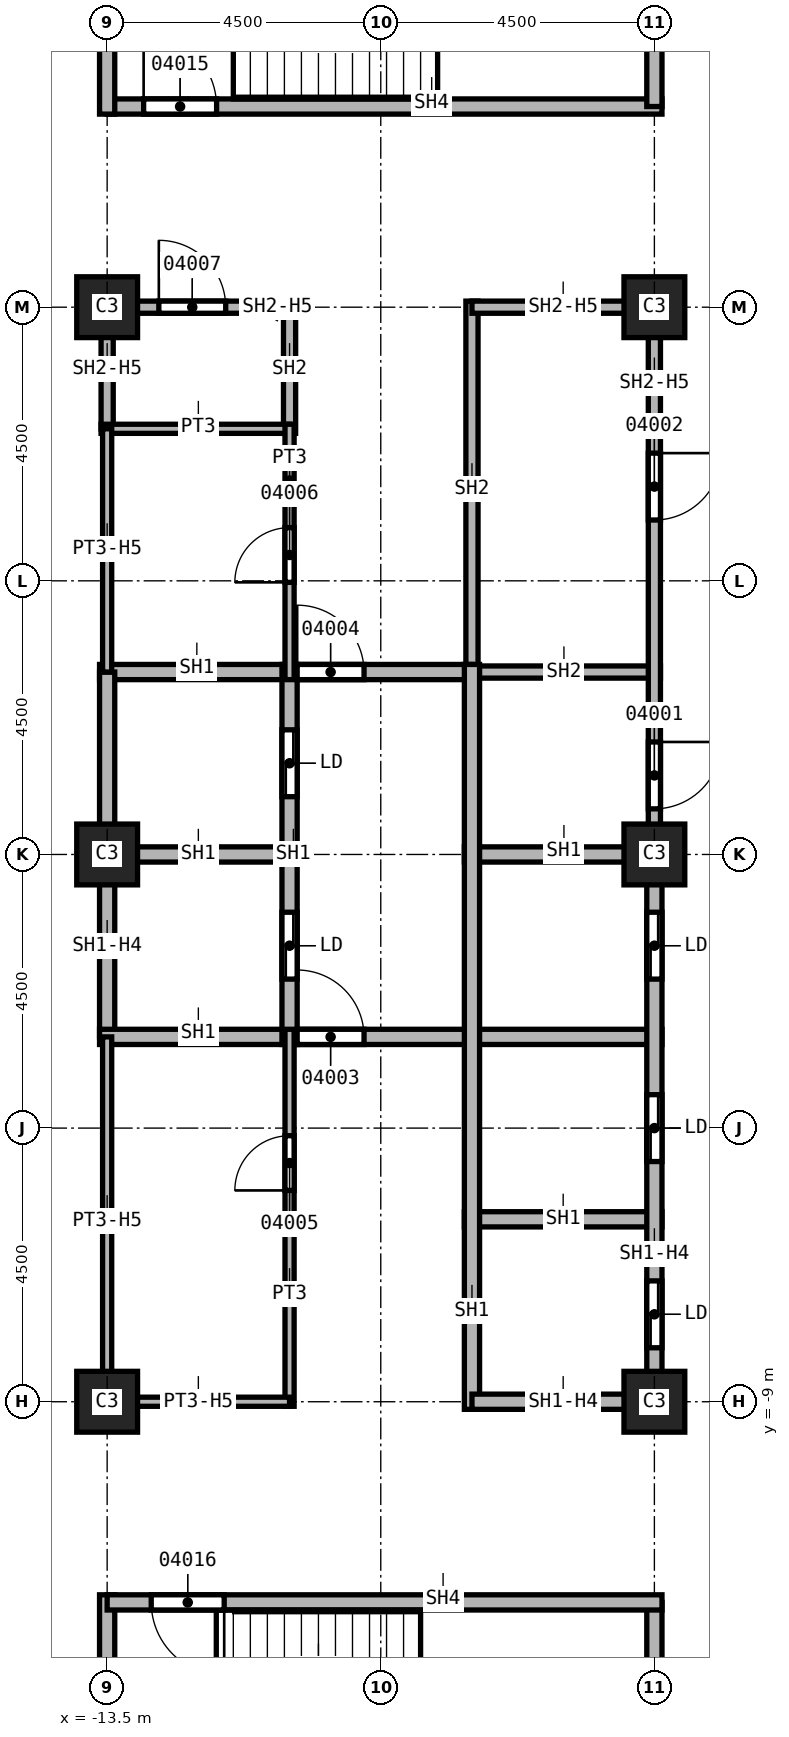
"""IFC4 building model, lengths in metres.
Left out: names, types, materials, properties, quantities, classifications, styles, units other than length and angle.
Written with IfcOpenShell. Run it as: python <this file> out.ifc"""

import sys

from ifc_helpers import new_model, si_unit, direction, frame, frame_2d, origin, origin_2d, place, context, subcontext, project, spatial, rectangle, extrude, element, fill, save


model = new_model("IFC4")
c1 = context("Model", 3, precision=1e-05, world=origin(), true_north=direction((0.0, 1.0)))
c2 = subcontext(c1, "Body", "Model", "MODEL_VIEW")
j1 = project(units=[si_unit("LENGTHUNIT", "METRE"), si_unit("PLANEANGLEUNIT", "RADIAN")], contexts=[c1])
p1 = place(None, origin())
s1 = spatial("IfcSite", under=j1, at=p1, CompositionType="ELEMENT")
p2 = place(p1, origin())
s2 = spatial("IfcBuilding", under=s1, at=p2, CompositionType="ELEMENT")
p3 = place(p2, frame((0.0, 0.0, 108.0)))
s3 = spatial("IfcBuildingStorey", under=s2, at=p3, CompositionType="ELEMENT", Elevation=108.0)
for number, where, z_axis, x_axis in (
    (1, (-4.5, 0.0, 0.0), (0.0, 0.0, 1.0), (1.0, 0.0, 0.0)),
    (2, (-4.5, 9.0, 0.0), (0.0, 0.0, 1.0), (1.0, 0.0, 0.0)),
    (3, (-4.5, -9.0, 0.0), (0.0, 0.0, 1.0), (1.0, 0.0, 0.0)),
    (4, (-13.5, 0.0, 0.0), (0.0, 0.0, 1.0), (1.0, 0.0, 0.0)),
    (5, (-13.5, 9.0, 0.0), (0.0, 0.0, 1.0), (1.0, 0.0, 0.0)),
    (6, (-13.5, -9.0, 0.0), (0.0, 0.0, 1.0), (1.0, 0.0, 0.0)),
):
    element("IfcColumn", number, at=place(p3, frame(where, z_axis=z_axis, x_axis=x_axis)), inside=s3, PredefinedType="COLUMN", context=c2, shape_type="SweptSolid", body=[
        extrude(rectangle(XDim=1.0, YDim=1.0, at=origin_2d()), origin(), (0.0, 0.0, 1.0), 3.7),
    ])
p4 = place(p3, frame((-13.5, 7.0, 0.0), z_axis=(0.0, 0.0, 1.0), x_axis=(0.0, 1.0, 0.0)))
e7 = element("IfcWall", 7, at=p4, inside=s3, PredefinedType="SOLIDWALL", context=c2, shape_type="SweptSolid", body=[
    extrude(rectangle(XDim=2.1, YDim=0.2, at=frame_2d((1.05, 0.0))), origin(), (0.0, 0.0, 1.0), 2.938),
])
p5 = place(p3, frame((-13.5, 9.0, 0.0), z_axis=(0.0, 0.0, 1.0), x_axis=(1.0, 0.0, 0.0)))
e8 = element("IfcWall", 8, at=p5, inside=s3, PredefinedType="SOLIDWALL", context=c2, shape_type="SweptSolid", body=[
    extrude(rectangle(XDim=3.0, YDim=0.2, at=frame_2d((1.5, 0.0))), origin(), (0.0, 0.0, 1.0), 2.938),
])
p6 = place(p5, frame((0.85, 0.0, 0.0)))
e9 = element("IfcOpeningElement", 9, at=p6, cuts=e8, PredefinedType="OPENING", context=c2, shape_type="SweptSolid", body=[
    extrude(rectangle(XDim=1.1, YDim=2.1, at=frame_2d((0.55, 1.05))), frame((0.0, 0.1, 0.0), z_axis=(0.0, -1.0, 0.0), x_axis=(1.0, 0.0, 0.0)), (0.0, 0.0, 1.0), 0.2),
])
p7 = place(p3, frame((-10.5, 6.925, 0.0), z_axis=(0.0, 0.0, 1.0), x_axis=(0.0, 1.0, 0.0)))
e10 = element("IfcWall", 10, at=p7, inside=s3, PredefinedType="SOLIDWALL", context=c2, shape_type="SweptSolid", body=[
    extrude(rectangle(XDim=2.175, YDim=0.2, at=frame_2d((1.087, 0.0))), origin(), (0.0, 0.0, 1.0), 3.7),
])
p8 = place(p3, frame((-7.625, 3.0, 0.0), z_axis=(0.0, 0.0, 1.0), x_axis=(1.0, 0.0, 0.0)))
e11 = element("IfcWall", 11, at=p8, inside=s3, PredefinedType="SOLIDWALL", context=c2, shape_type="SweptSolid", body=[
    extrude(rectangle(XDim=3.225, YDim=0.2, at=frame_2d((1.613, 0.0))), origin(), (0.0, 0.0, 1.0), 3.7),
])
p9 = place(p3, frame((-7.5, 2.875, 0.0), z_axis=(0.0, 0.0, 1.0), x_axis=(0.0, 1.0, 0.0)))
e12 = element("IfcWall", 12, at=p9, inside=s3, PredefinedType="SOLIDWALL", context=c2, shape_type="SweptSolid", body=[
    extrude(rectangle(XDim=6.225, YDim=0.2, at=frame_2d((3.113, 0.0))), origin(), (0.0, 0.0, 1.0), 3.7),
])
p10 = place(p3, frame((-7.5, 9.0, 0.0), z_axis=(0.0, 0.0, 1.0), x_axis=(1.0, 0.0, 0.0)))
e13 = element("IfcWall", 13, at=p10, inside=s3, PredefinedType="SOLIDWALL", context=c2, shape_type="SweptSolid", body=[
    extrude(rectangle(XDim=3.0, YDim=0.2, at=frame_2d((1.5, 0.0))), origin(), (0.0, 0.0, 1.0), 2.938),
])
p11 = place(p3, frame((-4.5, 9.1, 0.0), z_axis=(0.0, 0.0, 1.0), x_axis=(0.0, -1.0, 0.0)))
e14 = element("IfcWall", 14, at=p11, inside=s3, PredefinedType="SOLIDWALL", context=c2, shape_type="SweptSolid", body=[
    extrude(rectangle(XDim=9.1, YDim=0.2, at=frame_2d((4.55, 0.0))), origin(), (0.0, 0.0, 1.0), 2.938),
])
p12 = place(p11, frame((7.25, 0.0, 0.0)))
e15 = element("IfcOpeningElement", 15, at=p12, cuts=e14, PredefinedType="OPENING", context=c2, shape_type="SweptSolid", body=[
    extrude(rectangle(XDim=1.1, YDim=2.1, at=frame_2d((0.55, 1.05))), frame((0.0, 0.1, 0.0), z_axis=(0.0, -1.0, 0.0), x_axis=(1.0, 0.0, 0.0)), (0.0, 0.0, 1.0), 0.2),
])
p13 = place(p11, frame((2.5, 0.0, 0.0)))
e16 = element("IfcOpeningElement", 16, at=p13, cuts=e14, PredefinedType="OPENING", context=c2, shape_type="SweptSolid", body=[
    extrude(rectangle(XDim=1.1, YDim=2.1, at=frame_2d((0.55, 1.05))), frame((0.0, 0.1, 0.0), z_axis=(0.0, -1.0, 0.0), x_axis=(1.0, 0.0, 0.0)), (0.0, 0.0, 1.0), 0.2),
])
p14 = place(p3, frame((-13.625, 0.0, 0.0), z_axis=(0.0, 0.0, 1.0), x_axis=(1.0, 0.0, 0.0)))
e17 = element("IfcWall", 17, at=p14, inside=s3, PredefinedType="SOLIDWALL", context=c2, shape_type="SweptSolid", body=[
    extrude(rectangle(XDim=3.125, YDim=0.25, at=frame_2d((1.562, 0.0))), origin(), (0.0, 0.0, 1.0), 3.7),
])
p15 = place(p3, frame((-13.625, 3.0, 0.0), z_axis=(0.0, 0.0, 1.0), x_axis=(1.0, 0.0, 0.0)))
e18 = element("IfcWall", 18, at=p15, inside=s3, PredefinedType="SOLIDWALL", context=c2, shape_type="SweptSolid", body=[
    extrude(rectangle(XDim=6.125, YDim=0.25, at=frame_2d((3.062, 0.0))), origin(), (0.0, 0.0, 1.0), 3.7),
])
p16 = place(p15, frame((3.25, 0.0, 0.0)))
e19 = element("IfcOpeningElement", 19, at=p16, cuts=e18, PredefinedType="OPENING", context=c2, shape_type="SweptSolid", body=[
    extrude(rectangle(XDim=1.1, YDim=2.1, at=frame_2d((0.55, 1.05))), frame((0.0, 0.125, 0.0), z_axis=(0.0, -1.0, 0.0), x_axis=(1.0, 0.0, 0.0)), (0.0, 0.0, 1.0), 0.25),
])
p17 = place(p3, frame((-13.5, -3.0, 0.0), z_axis=(0.0, 0.0, 1.0), x_axis=(0.0, 1.0, 0.0)))
e20 = element("IfcWall", 20, at=p17, inside=s3, PredefinedType="SOLIDWALL", context=c2, shape_type="SweptSolid", body=[
    extrude(rectangle(XDim=6.0, YDim=0.25, at=frame_2d((3.0, 0.0))), origin(), (0.0, 0.0, 1.0), 2.938),
])
p18 = place(p3, frame((-13.625, -3.0, 0.0), z_axis=(0.0, 0.0, 1.0), x_axis=(1.0, 0.0, 0.0)))
e21 = element("IfcWall", 21, at=p18, inside=s3, PredefinedType="SOLIDWALL", context=c2, shape_type="SweptSolid", body=[
    extrude(rectangle(XDim=9.25, YDim=0.25, at=frame_2d((4.625, 0.0))), origin(), (0.0, 0.0, 1.0), 3.7),
])
p19 = place(p18, frame((3.25, 0.0, 0.0)))
e22 = element("IfcOpeningElement", 22, at=p19, cuts=e21, PredefinedType="OPENING", context=c2, shape_type="SweptSolid", body=[
    extrude(rectangle(XDim=1.1, YDim=2.1, at=frame_2d((0.55, 1.05))), frame((0.0, 0.125, 0.0), z_axis=(0.0, -1.0, 0.0), x_axis=(1.0, 0.0, 0.0)), (0.0, 0.0, 1.0), 0.25),
])
p20 = place(p3, frame((-10.5, -3.125, 0.0), z_axis=(0.0, 0.0, 1.0), x_axis=(0.0, 1.0, 0.0)))
e23 = element("IfcWall", 23, at=p20, inside=s3, PredefinedType="SOLIDWALL", context=c2, shape_type="SweptSolid", body=[
    extrude(rectangle(XDim=6.25, YDim=0.25, at=frame_2d((3.125, 0.0))), origin(), (0.0, 0.0, 1.0), 3.7),
])
p21 = place(p20, frame((1.075, 0.0, 0.0)))
e24 = element("IfcOpeningElement", 24, at=p21, cuts=e23, PredefinedType="OPENING", context=c2, shape_type="SweptSolid", body=[
    extrude(rectangle(XDim=1.1, YDim=2.1, at=frame_2d((0.55, 1.05))), frame((0.0, 0.125, 0.0), z_axis=(0.0, -1.0, 0.0), x_axis=(1.0, 0.0, 0.0)), (0.0, 0.0, 1.0), 0.25),
])
p22 = place(p20, frame((4.075, 0.0, 0.0)))
e25 = element("IfcOpeningElement", 25, at=p22, cuts=e23, PredefinedType="OPENING", context=c2, shape_type="SweptSolid", body=[
    extrude(rectangle(XDim=1.1, YDim=2.1, at=frame_2d((0.55, 1.05))), frame((0.0, 0.125, 0.0), z_axis=(0.0, -1.0, 0.0), x_axis=(1.0, 0.0, 0.0)), (0.0, 0.0, 1.0), 0.25),
])
for number, where, z_axis, x_axis in (
    (26, (-7.625, -6.0, 0.0), (0.0, 0.0, 1.0), (1.0, 0.0, 0.0)),
    (27, (-7.625, 0.0, 0.0), (0.0, 0.0, 1.0), (1.0, 0.0, 0.0)),
):
    element("IfcWall", number, at=place(p3, frame(where, z_axis=z_axis, x_axis=x_axis)), inside=s3, PredefinedType="SOLIDWALL", context=c2, shape_type="SweptSolid", body=[
        extrude(rectangle(XDim=3.25, YDim=0.25, at=frame_2d((1.625, 0.0))), origin(), (0.0, 0.0, 1.0), 3.7),
    ])
p23 = place(p3, frame((-7.5, -9.125, 0.0), z_axis=(0.0, 0.0, 1.0), x_axis=(0.0, 1.0, 0.0)))
e28 = element("IfcWall", 28, at=p23, inside=s3, PredefinedType="SOLIDWALL", context=c2, shape_type="SweptSolid", body=[
    extrude(rectangle(XDim=12.25, YDim=0.25, at=frame_2d((6.125, 0.0))), origin(), (0.0, 0.0, 1.0), 3.7),
])
p24 = place(p3, frame((-4.5, -9.0, 0.0), z_axis=(0.0, 0.0, 1.0), x_axis=(-1.0, 0.0, 0.0)))
e29 = element("IfcWall", 29, at=p24, inside=s3, PredefinedType="SOLIDWALL", context=c2, shape_type="SweptSolid", body=[
    extrude(rectangle(XDim=3.0, YDim=0.25, at=frame_2d((1.5, 0.0))), origin(), (0.0, 0.0, 1.0), 2.938),
])
p25 = place(p3, frame((-4.5, 0.0, 0.0), z_axis=(0.0, 0.0, 1.0), x_axis=(0.0, -1.0, 0.0)))
e30 = element("IfcWall", 30, at=p25, inside=s3, PredefinedType="SOLIDWALL", context=c2, shape_type="SweptSolid", body=[
    extrude(rectangle(XDim=9.125, YDim=0.25, at=frame_2d((4.562, 0.0))), origin(), (0.0, 0.0, 1.0), 2.938),
])
p26 = place(p25, frame((7.012, 0.0, 0.0)))
e31 = element("IfcOpeningElement", 31, at=p26, cuts=e30, PredefinedType="OPENING", context=c2, shape_type="SweptSolid", body=[
    extrude(rectangle(XDim=1.1, YDim=2.1, at=frame_2d((0.55, 1.05))), frame((0.0, 0.125, 0.0), z_axis=(0.0, -1.0, 0.0), x_axis=(1.0, 0.0, 0.0)), (0.0, 0.0, 1.0), 0.25),
])
p27 = place(p25, frame((3.95, 0.0, 0.0)))
e32 = element("IfcOpeningElement", 32, at=p27, cuts=e30, PredefinedType="OPENING", context=c2, shape_type="SweptSolid", body=[
    extrude(rectangle(XDim=1.1, YDim=2.1, at=frame_2d((0.55, 1.05))), frame((0.0, 0.125, 0.0), z_axis=(0.0, -1.0, 0.0), x_axis=(1.0, 0.0, 0.0)), (0.0, 0.0, 1.0), 0.25),
])
p28 = place(p25, frame((0.95, 0.0, 0.0)))
e33 = element("IfcOpeningElement", 33, at=p28, cuts=e30, PredefinedType="OPENING", context=c2, shape_type="SweptSolid", body=[
    extrude(rectangle(XDim=1.1, YDim=2.1, at=frame_2d((0.55, 1.05))), frame((0.0, 0.125, 0.0), z_axis=(0.0, -1.0, 0.0), x_axis=(1.0, 0.0, 0.0)), (0.0, 0.0, 1.0), 0.25),
])
p29 = place(p3, frame((-13.5, -12.175, 0.0), z_axis=(0.0, 0.0, 1.0), x_axis=(0.0, -1.0, 0.0)))
e34 = element("IfcWall", 34, at=p29, inside=s3, PredefinedType="SOLIDWALL", context=c2, shape_type="SweptSolid", body=[
    extrude(rectangle(XDim=4.75, YDim=0.25, at=frame_2d((2.375, 0.0))), origin(), (0.0, 0.0, 1.0), 3.7),
])
p30 = place(p3, frame((-13.5, 12.3, 0.0), z_axis=(0.0, 0.0, 1.0), x_axis=(1.0, 0.0, 0.0)))
e35 = element("IfcWall", 35, at=p30, inside=s3, PredefinedType="SOLIDWALL", context=c2, shape_type="SweptSolid", body=[
    extrude(rectangle(XDim=9.125, YDim=0.25, at=frame_2d((4.562, 0.0))), origin(), (0.0, 0.0, 1.0), 3.7),
])
p31 = place(p30, frame((0.6, 0.0, 0.0)))
e36 = element("IfcOpeningElement", 36, at=p31, cuts=e35, PredefinedType="OPENING", context=c2, shape_type="SweptSolid", body=[
    extrude(rectangle(XDim=1.2, YDim=2.1, at=frame_2d((0.6, 1.05))), frame((0.0, 0.125, 0.0), z_axis=(0.0, -1.0, 0.0), x_axis=(1.0, 0.0, 0.0)), (0.0, 0.0, 1.0), 0.25),
])
p32 = place(p3, frame((-13.5, 12.175, 0.0), z_axis=(0.0, 0.0, 1.0), x_axis=(0.0, 1.0, 0.0)))
e37 = element("IfcWall", 37, at=p32, inside=s3, PredefinedType="SOLIDWALL", context=c2, shape_type="SweptSolid", body=[
    extrude(rectangle(XDim=4.75, YDim=0.25, at=frame_2d((2.375, 0.0))), origin(), (0.0, 0.0, 1.0), 3.7),
])
p33 = place(p3, frame((-4.5, -12.3, 0.0), z_axis=(0.0, 0.0, 1.0), x_axis=(0.0, -1.0, 0.0)))
e38 = element("IfcWall", 38, at=p33, inside=s3, PredefinedType="SOLIDWALL", context=c2, shape_type="SweptSolid", body=[
    extrude(rectangle(XDim=4.625, YDim=0.25, at=frame_2d((2.312, 0.0))), origin(), (0.0, 0.0, 1.0), 3.7),
])
p34 = place(p3, frame((-4.5, 16.8, 0.0), z_axis=(0.0, 0.0, 1.0), x_axis=(0.0, -1.0, 0.0)))
e39 = element("IfcWall", 39, at=p34, inside=s3, PredefinedType="SOLIDWALL", context=c2, shape_type="SweptSolid", body=[
    extrude(rectangle(XDim=4.5, YDim=0.25, at=frame_2d((2.25, 0.0))), origin(), (0.0, 0.0, 1.0), 3.7),
])
p35 = place(p3, frame((-4.375, -12.3, 0.0), z_axis=(0.0, 0.0, 1.0), x_axis=(-1.0, 0.0, 0.0)))
e40 = element("IfcWall", 40, at=p35, inside=s3, PredefinedType="SOLIDWALL", context=c2, shape_type="SweptSolid", body=[
    extrude(rectangle(XDim=9.125, YDim=0.25, at=frame_2d((4.562, 0.0))), origin(), (0.0, 0.0, 1.0), 3.7),
])
p36 = place(p35, frame((7.2, 0.0, 0.0)))
e41 = element("IfcOpeningElement", 41, at=p36, cuts=e40, PredefinedType="OPENING", context=c2, shape_type="SweptSolid", body=[
    extrude(rectangle(XDim=1.2, YDim=2.1, at=frame_2d((0.6, 1.05))), frame((0.0, 0.125, 0.0), z_axis=(0.0, -1.0, 0.0), x_axis=(1.0, 0.0, 0.0)), (0.0, 0.0, 1.0), 0.25),
])
p37 = place(p3, frame((-13.6, 7.0, 0.0), z_axis=(0.0, 0.0, 1.0), x_axis=(1.0, 0.0, 0.0)))
e42 = element("IfcWall", 42, at=p37, inside=s3, PredefinedType="PARTITIONING", context=c2, shape_type="SweptSolid", body=[
    extrude(rectangle(XDim=3.1, YDim=0.15, at=frame_2d((1.55, 0.0))), origin(), (0.0, 0.0, 1.0), 3.7),
])
p38 = place(p3, frame((-13.5, -9.075, 0.0), z_axis=(0.0, 0.0, 1.0), x_axis=(0.0, 1.0, 0.0)))
e43 = element("IfcWall", 43, at=p38, inside=s3, PredefinedType="PARTITIONING", context=c2, shape_type="SweptSolid", body=[
    extrude(rectangle(XDim=6.075, YDim=0.15, at=frame_2d((3.038, 0.0))), origin(), (0.0, 0.0, 1.0), 2.938),
])
p39 = place(p3, frame((-13.5, 3.0, 0.0), z_axis=(0.0, 0.0, 1.0), x_axis=(0.0, 1.0, 0.0)))
e44 = element("IfcWall", 44, at=p39, inside=s3, PredefinedType="PARTITIONING", context=c2, shape_type="SweptSolid", body=[
    extrude(rectangle(XDim=4.0, YDim=0.15, at=frame_2d((2.0, 0.0))), origin(), (0.0, 0.0, 1.0), 2.938),
])
p40 = place(p3, frame((-10.5, -9.075, 0.0), z_axis=(0.0, 0.0, 1.0), x_axis=(0.0, 1.0, 0.0)))
e45 = element("IfcWall", 45, at=p40, inside=s3, PredefinedType="PARTITIONING", context=c2, shape_type="SweptSolid", body=[
    extrude(rectangle(XDim=6.2, YDim=0.15, at=frame_2d((3.1, 0.0))), origin(), (0.0, 0.0, 1.0), 3.7),
])
p41 = place(p40, frame((3.55, 0.0, 0.0)))
e46 = element("IfcOpeningElement", 46, at=p41, cuts=e45, PredefinedType="OPENING", context=c2, shape_type="SweptSolid", body=[
    extrude(rectangle(XDim=0.9, YDim=2.1, at=frame_2d((0.45, 1.05))), frame((0.0, 0.075, 0.0), z_axis=(0.0, -1.0, 0.0), x_axis=(1.0, 0.0, 0.0)), (0.0, 0.0, 1.0), 0.15),
])
p42 = place(p3, frame((-10.5, -9.0, 0.0), z_axis=(0.0, 0.0, 1.0), x_axis=(-1.0, 0.0, 0.0)))
e47 = element("IfcWall", 47, at=p42, inside=s3, PredefinedType="PARTITIONING", context=c2, shape_type="SweptSolid", body=[
    extrude(rectangle(XDim=3.0, YDim=0.15, at=frame_2d((1.5, 0.0))), origin(), (0.0, 0.0, 1.0), 2.938),
])
p43 = place(p3, frame((-10.5, 2.875, 0.0), z_axis=(0.0, 0.0, 1.0), x_axis=(0.0, 1.0, 0.0)))
e48 = element("IfcWall", 48, at=p43, inside=s3, PredefinedType="PARTITIONING", context=c2, shape_type="SweptSolid", body=[
    extrude(rectangle(XDim=4.2, YDim=0.15, at=frame_2d((2.1, 0.0))), origin(), (0.0, 0.0, 1.0), 3.7),
])
p44 = place(p43, frame((1.6, 0.0, 0.0)))
e49 = element("IfcOpeningElement", 49, at=p44, cuts=e48, PredefinedType="OPENING", context=c2, shape_type="SweptSolid", body=[
    extrude(rectangle(XDim=0.9, YDim=2.1, at=frame_2d((0.45, 1.05))), frame((0.0, 0.075, 0.0), z_axis=(0.0, -1.0, 0.0), x_axis=(1.0, 0.0, 0.0)), (0.0, 0.0, 1.0), 0.15),
])
p45 = place(p12, origin())
e50 = element("IfcDoor", 50, at=p45, inside=s3, OperationType="SINGLE_SWING_RIGHT", PredefinedType="DOOR", context=c2, shape_type="SweptSolid", body=[
    extrude(rectangle(XDim=1.1, YDim=2.1, at=frame_2d((0.55, 1.05))), frame((0.0, 0.025, 0.0), z_axis=(0.0, -1.0, 0.0), x_axis=(1.0, 0.0, 0.0)), (0.0, 0.0, 1.0), 0.05),
])
fill(e15, e50)
p46 = place(p13, origin())
e51 = element("IfcDoor", 51, at=p46, inside=s3, OperationType="SINGLE_SWING_LEFT", PredefinedType="DOOR", context=c2, shape_type="SweptSolid", body=[
    extrude(rectangle(XDim=1.1, YDim=2.1, at=frame_2d((0.55, 1.05))), frame((0.0, 0.025, 0.0), z_axis=(0.0, -1.0, 0.0), x_axis=(1.0, 0.0, 0.0)), (0.0, 0.0, 1.0), 0.05),
])
fill(e16, e51)
p47 = place(p19, origin())
e52 = element("IfcDoor", 52, at=p47, inside=s3, OperationType="SINGLE_SWING_RIGHT", PredefinedType="DOOR", context=c2, shape_type="SweptSolid", body=[
    extrude(rectangle(XDim=1.1, YDim=2.1, at=frame_2d((0.55, 1.05))), frame((0.0, 0.025, 0.0), z_axis=(0.0, -1.0, 0.0), x_axis=(1.0, 0.0, 0.0)), (0.0, 0.0, 1.0), 0.05),
])
fill(e22, e52)
p48 = place(p16, origin())
e53 = element("IfcDoor", 53, at=p48, inside=s3, OperationType="SINGLE_SWING_LEFT", PredefinedType="DOOR", context=c2, shape_type="SweptSolid", body=[
    extrude(rectangle(XDim=1.1, YDim=2.1, at=frame_2d((0.55, 1.05))), frame((0.0, 0.025, 0.0), z_axis=(0.0, -1.0, 0.0), x_axis=(1.0, 0.0, 0.0)), (0.0, 0.0, 1.0), 0.05),
])
fill(e19, e53)
p49 = place(p41, origin())
e54 = element("IfcDoor", 54, at=p49, inside=s3, OperationType="SINGLE_SWING_RIGHT", PredefinedType="DOOR", context=c2, shape_type="SweptSolid", body=[
    extrude(rectangle(XDim=0.9, YDim=2.1, at=frame_2d((0.45, 1.05))), frame((0.0, 0.025, 0.0), z_axis=(0.0, -1.0, 0.0), x_axis=(1.0, 0.0, 0.0)), (0.0, 0.0, 1.0), 0.05),
])
fill(e46, e54)
p50 = place(p44, origin())
e55 = element("IfcDoor", 55, at=p50, inside=s3, OperationType="SINGLE_SWING_LEFT", PredefinedType="DOOR", context=c2, shape_type="SweptSolid", body=[
    extrude(rectangle(XDim=0.9, YDim=2.1, at=frame_2d((0.45, 1.05))), frame((0.0, 0.025, 0.0), z_axis=(0.0, -1.0, 0.0), x_axis=(1.0, 0.0, 0.0)), (0.0, 0.0, 1.0), 0.05),
])
fill(e49, e55)
p51 = place(p6, origin())
e56 = element("IfcDoor", 56, at=p51, inside=s3, OperationType="SINGLE_SWING_RIGHT", PredefinedType="DOOR", context=c2, shape_type="SweptSolid", body=[
    extrude(rectangle(XDim=1.1, YDim=2.1, at=frame_2d((0.55, 1.05))), frame((0.0, 0.025, 0.0), z_axis=(0.0, -1.0, 0.0), x_axis=(1.0, 0.0, 0.0)), (0.0, 0.0, 1.0), 0.05),
])
fill(e9, e56)
p52 = place(p31, origin())
e57 = element("IfcDoor", 57, at=p52, inside=s3, OperationType="SINGLE_SWING_RIGHT", PredefinedType="DOOR", context=c2, shape_type="SweptSolid", body=[
    extrude(rectangle(XDim=1.2, YDim=2.1, at=frame_2d((0.6, 1.05))), frame((0.0, 0.025, 0.0), z_axis=(0.0, -1.0, 0.0), x_axis=(1.0, 0.0, 0.0)), (0.0, 0.0, 1.0), 0.05),
])
fill(e36, e57)
p53 = place(p36, origin())
e58 = element("IfcDoor", 58, at=p53, inside=s3, OperationType="SINGLE_SWING_LEFT", PredefinedType="DOOR", context=c2, shape_type="SweptSolid", body=[
    extrude(rectangle(XDim=1.2, YDim=2.1, at=frame_2d((0.6, 1.05))), frame((0.0, 0.025, 0.0), z_axis=(0.0, -1.0, 0.0), x_axis=(1.0, 0.0, 0.0)), (0.0, 0.0, 1.0), 0.05),
])
fill(e41, e58)
p54 = place(p26, origin())
e59 = element("IfcDoor", 59, at=p54, inside=s3, OperationType="SLIDING_TO_LEFT", PredefinedType="DOOR", context=c2, shape_type="SweptSolid", body=[
    extrude(rectangle(XDim=1.1, YDim=2.1, at=frame_2d((0.55, 1.05))), frame((0.0, 0.025, 0.0), z_axis=(0.0, -1.0, 0.0), x_axis=(1.0, 0.0, 0.0)), (0.0, 0.0, 1.0), 0.05),
])
fill(e31, e59)
p55 = place(p27, origin())
e60 = element("IfcDoor", 60, at=p55, inside=s3, OperationType="SLIDING_TO_LEFT", PredefinedType="DOOR", context=c2, shape_type="SweptSolid", body=[
    extrude(rectangle(XDim=1.1, YDim=2.1, at=frame_2d((0.55, 1.05))), frame((0.0, 0.025, 0.0), z_axis=(0.0, -1.0, 0.0), x_axis=(1.0, 0.0, 0.0)), (0.0, 0.0, 1.0), 0.05),
])
fill(e32, e60)
p56 = place(p28, origin())
e61 = element("IfcDoor", 61, at=p56, inside=s3, OperationType="SLIDING_TO_LEFT", PredefinedType="DOOR", context=c2, shape_type="SweptSolid", body=[
    extrude(rectangle(XDim=1.1, YDim=2.1, at=frame_2d((0.55, 1.05))), frame((0.0, 0.025, 0.0), z_axis=(0.0, -1.0, 0.0), x_axis=(1.0, 0.0, 0.0)), (0.0, 0.0, 1.0), 0.05),
])
fill(e33, e61)
p57 = place(p21, origin())
e62 = element("IfcDoor", 62, at=p57, inside=s3, OperationType="SLIDING_TO_LEFT", PredefinedType="DOOR", context=c2, shape_type="SweptSolid", body=[
    extrude(rectangle(XDim=1.1, YDim=2.1, at=frame_2d((0.55, 1.05))), frame((0.0, 0.025, 0.0), z_axis=(0.0, -1.0, 0.0), x_axis=(1.0, 0.0, 0.0)), (0.0, 0.0, 1.0), 0.05),
])
fill(e24, e62)
p58 = place(p22, origin())
e63 = element("IfcDoor", 63, at=p58, inside=s3, OperationType="SLIDING_TO_LEFT", PredefinedType="DOOR", context=c2, shape_type="SweptSolid", body=[
    extrude(rectangle(XDim=1.1, YDim=2.1, at=frame_2d((0.55, 1.05))), frame((0.0, 0.025, 0.0), z_axis=(0.0, -1.0, 0.0), x_axis=(1.0, 0.0, 0.0)), (0.0, 0.0, 1.0), 0.05),
])
fill(e25, e63)
save(model, sys.argv[1])
